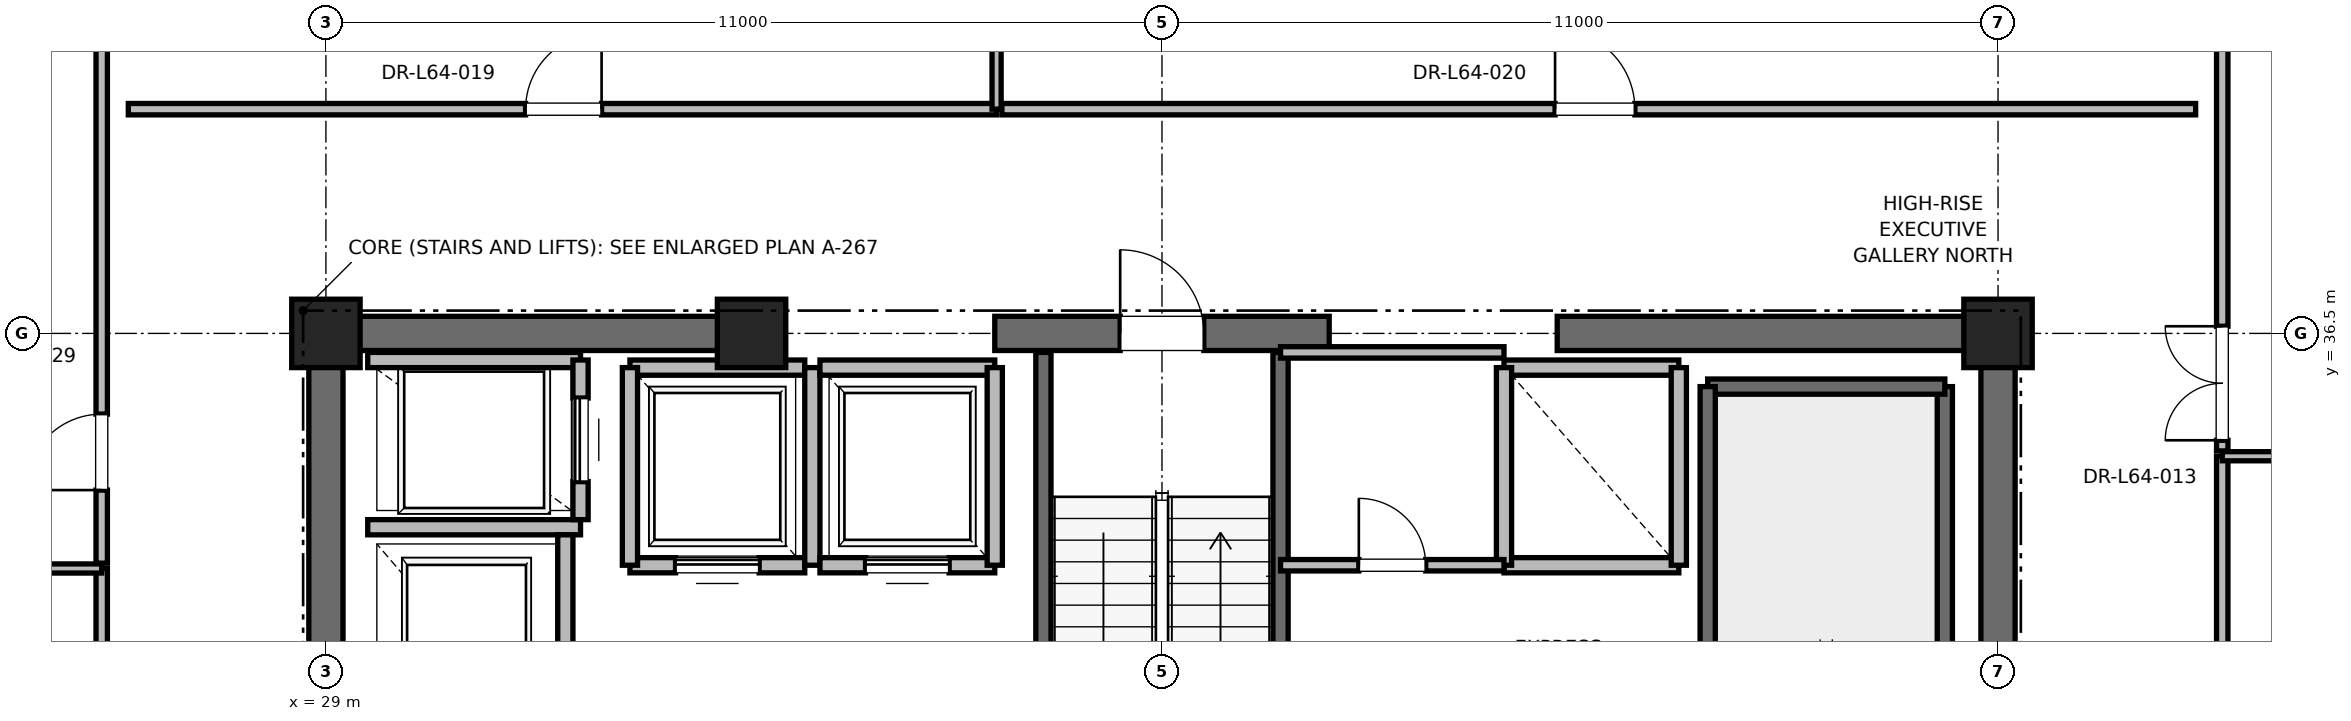
"""IFC4 building model, lengths in metres.
Left out: names, types, materials, properties, quantities, classifications, styles, units other than length and angle.
Written with IfcOpenShell. Run it as: python <this file> out.ifc"""

import sys

from ifc_helpers import new_model, si_unit, direction, frame, frame_2d, origin, origin_2d, place, context, subcontext, project, spatial, rectangle, extrude, element, fill, save


model = new_model("IFC4")
c1 = context("Model", 3, precision=1e-05, world=origin(), true_north=direction((0.0, 1.0)))
c2 = subcontext(c1, "Body", "Model", "MODEL_VIEW")
j1 = project(units=[si_unit("LENGTHUNIT", "METRE"), si_unit("PLANEANGLEUNIT", "RADIAN")], contexts=[c1])
p1 = place(None, origin())
s1 = spatial("IfcSite", under=j1, at=p1, CompositionType="ELEMENT")
p2 = place(p1, origin())
s2 = spatial("IfcBuilding", under=s1, at=p2, CompositionType="ELEMENT")
p3 = place(p2, frame((0.0, 0.0, 275.2)))
s3 = spatial("IfcBuildingStorey", under=s2, at=p3, CompositionType="ELEMENT", Elevation=275.2)
for number, where, z_axis, x_axis in (
    (1, (29.0, 36.5, 0.0), (0.0, 0.0, 1.0), (1.0, 0.0, 0.0)),
    (2, (51.0, 36.5, 0.0), (0.0, 0.0, 1.0), (1.0, 0.0, 0.0)),
    (3, (34.6, 36.5, 0.0), (0.0, 0.0, 1.0), (1.0, 0.0, 0.0)),
):
    element("IfcColumn", number, at=place(p3, frame(where, z_axis=z_axis, x_axis=x_axis)), inside=s3, PredefinedType="PILASTER", context=c2, shape_type="SweptSolid", body=[
        extrude(rectangle(XDim=0.9, YDim=0.9, at=origin_2d()), origin(), (0.0, 0.0, 1.0), 4.0),
    ])
p4 = place(p3, frame((29.0, 36.5, 0.0), z_axis=(0.0, 0.0, 1.0), x_axis=(1.0, 0.0, 0.0)))
e4 = element("IfcWall", 4, at=p4, inside=s3, PredefinedType="SHEAR", context=c2, shape_type="SweptSolid", body=[
    extrude(rectangle(XDim=5.8, YDim=0.45, at=frame_2d((2.9, 0.0))), origin(), (0.0, 0.0, 1.0), 3.785),
])
p5 = place(p3, frame((37.8, 36.5, 0.0), z_axis=(0.0, 0.0, 1.0), x_axis=(1.0, 0.0, 0.0)))
e5 = element("IfcWall", 5, at=p5, inside=s3, PredefinedType="SHEAR", context=c2, shape_type="SweptSolid", body=[
    extrude(rectangle(XDim=4.4, YDim=0.45, at=frame_2d((2.2, 0.0))), origin(), (0.0, 0.0, 1.0), 3.785),
])
p6 = place(p5, frame((1.65, 0.0, 0.0)))
e6 = element("IfcOpeningElement", 6, at=p6, cuts=e5, PredefinedType="OPENING", context=c2, shape_type="SweptSolid", body=[
    extrude(rectangle(XDim=1.1, YDim=2.15, at=frame_2d((0.55, 1.075))), frame((0.0, 0.225, 0.0), z_axis=(0.0, -1.0, 0.0), x_axis=(1.0, 0.0, 0.0)), (0.0, 0.0, 1.0), 0.45),
])
for number, where, z_axis, x_axis in (
    (7, (45.2, 36.5, 0.0), (0.0, 0.0, 1.0), (1.0, 0.0, 0.0)),
    (8, (29.0, 30.7, 0.0), (0.0, 0.0, 1.0), (0.0, 1.0, 0.0)),
):
    element("IfcWall", number, at=place(p3, frame(where, z_axis=z_axis, x_axis=x_axis)), inside=s3, PredefinedType="SHEAR", context=c2, shape_type="SweptSolid", body=[
        extrude(rectangle(XDim=5.8, YDim=0.45, at=frame_2d((2.9, 0.0))), origin(), (0.0, 0.0, 1.0), 3.785),
    ])
p7 = place(p3, frame((51.0, 27.7, 0.0), z_axis=(0.0, 0.0, 1.0), x_axis=(0.0, 1.0, 0.0)))
e9 = element("IfcWall", 9, at=p7, inside=s3, PredefinedType="SHEAR", context=c2, shape_type="SweptSolid", body=[
    extrude(rectangle(XDim=8.8, YDim=0.45, at=frame_2d((4.4, 0.0))), origin(), (0.0, 0.0, 1.0), 3.785),
])
p8 = place(p3, frame((50.3, 27.65, 0.0), z_axis=(0.0, 0.0, 1.0), x_axis=(0.0, 1.0, 0.0)))
e10 = element("IfcWall", 10, at=p8, inside=s3, PredefinedType="SOLIDWALL", context=c2, shape_type="SweptSolid", body=[
    extrude(rectangle(XDim=8.15, YDim=0.2, at=frame_2d((4.075, 0.0))), origin(), (0.0, 0.0, 1.0), 3.785),
])
p9 = place(p3, frame((47.18, 35.8, 0.0), z_axis=(0.0, 0.0, 1.0), x_axis=(1.0, 0.0, 0.0)))
e11 = element("IfcWall", 11, at=p9, inside=s3, PredefinedType="SOLIDWALL", context=c2, shape_type="SweptSolid", body=[
    extrude(rectangle(XDim=3.12, YDim=0.2, at=frame_2d((1.56, 0.0))), origin(), (0.0, 0.0, 1.0), 3.785),
])
p10 = place(p3, frame((47.18, 27.62, 0.0), z_axis=(0.0, 0.0, 1.0), x_axis=(0.0, 1.0, 0.0)))
e12 = element("IfcWall", 12, at=p10, inside=s3, PredefinedType="SOLIDWALL", context=c2, shape_type="SweptSolid", body=[
    extrude(rectangle(XDim=8.18, YDim=0.2, at=frame_2d((4.09, 0.0))), origin(), (0.0, 0.0, 1.0), 3.785),
])
p11 = place(p3, frame((38.44, 27.38, 0.0), z_axis=(0.0, 0.0, 1.0), x_axis=(0.0, 1.0, 0.0)))
e13 = element("IfcWall", 13, at=p11, inside=s3, PredefinedType="SOLIDWALL", context=c2, shape_type="SweptSolid", body=[
    extrude(rectangle(XDim=8.87, YDim=0.2, at=frame_2d((4.435, 0.0))), origin(), (0.0, 0.0, 1.0), 3.785),
])
p12 = place(p3, frame((41.56, 27.68, 0.0), z_axis=(0.0, 0.0, 1.0), x_axis=(0.0, 1.0, 0.0)))
e14 = element("IfcWall", 14, at=p12, inside=s3, PredefinedType="SOLIDWALL", context=c2, shape_type="SweptSolid", body=[
    extrude(rectangle(XDim=8.57, YDim=0.2, at=frame_2d((4.285, 0.0))), origin(), (0.0, 0.0, 1.0), 3.785),
])
p13 = place(p3, frame((29.55, 33.95, 0.0), z_axis=(0.0, 0.0, 1.0), x_axis=(1.0, 0.0, 0.0)))
e15 = element("IfcWall", 15, at=p13, inside=s3, PredefinedType="SOLIDWALL", context=c2, shape_type="SweptSolid", body=[
    extrude(rectangle(XDim=2.8, YDim=0.2, at=frame_2d((1.4, 0.0))), origin(), (0.0, 0.0, 1.0), 3.785),
])
p14 = place(p3, frame((32.15, 30.85, 0.0), z_axis=(0.0, 0.0, 1.0), x_axis=(0.0, 1.0, 0.0)))
e16 = element("IfcWall", 16, at=p14, inside=s3, PredefinedType="SOLIDWALL", context=c2, shape_type="SweptSolid", body=[
    extrude(rectangle(XDim=3.0, YDim=0.2, at=frame_2d((1.5, 0.0))), origin(), (0.0, 0.0, 1.0), 3.785),
])
p15 = place(p3, frame((32.35, 36.15, 0.0), z_axis=(0.0, 0.0, 1.0), x_axis=(-1.0, 0.0, 0.0)))
e17 = element("IfcWall", 17, at=p15, inside=s3, PredefinedType="SOLIDWALL", context=c2, shape_type="SweptSolid", body=[
    extrude(rectangle(XDim=2.8, YDim=0.2, at=frame_2d((1.4, 0.0))), origin(), (0.0, 0.0, 1.0), 3.148),
])
p16 = place(p3, frame((32.35, 34.05, 0.0), z_axis=(0.0, 0.0, 1.0), x_axis=(0.0, 1.0, 0.0)))
e18 = element("IfcWall", 18, at=p16, inside=s3, PredefinedType="SOLIDWALL", context=c2, shape_type="SweptSolid", body=[
    extrude(rectangle(XDim=2.1, YDim=0.2, at=frame_2d((1.05, 0.0))), origin(), (0.0, 0.0, 1.0), 3.785),
])
p17 = place(p16, frame((0.5, 0.0, 0.0)))
e19 = element("IfcOpeningElement", 19, at=p17, cuts=e18, PredefinedType="OPENING", context=c2, shape_type="SweptSolid", body=[
    extrude(rectangle(XDim=1.1, YDim=2.2, at=frame_2d((0.55, 1.1))), frame((0.0, 0.1, 0.0), z_axis=(0.0, -1.0, 0.0), x_axis=(1.0, 0.0, 0.0)), (0.0, 0.0, 1.0), 0.2),
])
p18 = place(p3, frame((33.0, 33.45, 0.0), z_axis=(0.0, 0.0, 1.0), x_axis=(1.0, 0.0, 0.0)))
e20 = element("IfcWall", 20, at=p18, inside=s3, PredefinedType="SOLIDWALL", context=c2, shape_type="SweptSolid", body=[
    extrude(rectangle(XDim=2.3, YDim=0.2, at=frame_2d((1.15, 0.0))), origin(), (0.0, 0.0, 1.0), 3.785),
])
p19 = place(p18, frame((0.6, 0.0, 0.0)))
e21 = element("IfcOpeningElement", 21, at=p19, cuts=e20, PredefinedType="OPENING", context=c2, shape_type="SweptSolid", body=[
    extrude(rectangle(XDim=1.1, YDim=2.2, at=frame_2d((0.55, 1.1))), frame((0.0, 0.1, 0.0), z_axis=(0.0, -1.0, 0.0), x_axis=(1.0, 0.0, 0.0)), (0.0, 0.0, 1.0), 0.2),
])
p20 = place(p3, frame((35.3, 36.05, 0.0), z_axis=(0.0, 0.0, 1.0), x_axis=(-1.0, 0.0, 0.0)))
e22 = element("IfcWall", 22, at=p20, inside=s3, PredefinedType="SOLIDWALL", context=c2, shape_type="SweptSolid", body=[
    extrude(rectangle(XDim=2.3, YDim=0.2, at=frame_2d((1.15, 0.0))), origin(), (0.0, 0.0, 1.0), 2.865),
])
p21 = place(p3, frame((33.0, 36.05, 0.0), z_axis=(0.0, 0.0, 1.0), x_axis=(0.0, -1.0, 0.0)))
e23 = element("IfcWall", 23, at=p21, inside=s3, PredefinedType="SOLIDWALL", context=c2, shape_type="SweptSolid", body=[
    extrude(rectangle(XDim=2.6, YDim=0.2, at=frame_2d((1.3, 0.0))), origin(), (0.0, 0.0, 1.0), 3.785),
])
p22 = place(p3, frame((35.4, 33.45, 0.0), z_axis=(0.0, 0.0, 1.0), x_axis=(0.0, 1.0, 0.0)))
e24 = element("IfcWall", 24, at=p22, inside=s3, PredefinedType="SOLIDWALL", context=c2, shape_type="SweptSolid", body=[
    extrude(rectangle(XDim=2.6, YDim=0.2, at=frame_2d((1.3, 0.0))), origin(), (0.0, 0.0, 1.0), 2.865),
])
p23 = place(p3, frame((35.5, 33.45, 0.0), z_axis=(0.0, 0.0, 1.0), x_axis=(1.0, 0.0, 0.0)))
e25 = element("IfcWall", 25, at=p23, inside=s3, PredefinedType="SOLIDWALL", context=c2, shape_type="SweptSolid", body=[
    extrude(rectangle(XDim=2.3, YDim=0.2, at=frame_2d((1.15, 0.0))), origin(), (0.0, 0.0, 1.0), 3.785),
])
p24 = place(p23, frame((0.6, 0.0, 0.0)))
e26 = element("IfcOpeningElement", 26, at=p24, cuts=e25, PredefinedType="OPENING", context=c2, shape_type="SweptSolid", body=[
    extrude(rectangle(XDim=1.1, YDim=2.2, at=frame_2d((0.55, 1.1))), frame((0.0, 0.1, 0.0), z_axis=(0.0, -1.0, 0.0), x_axis=(1.0, 0.0, 0.0)), (0.0, 0.0, 1.0), 0.2),
])
p25 = place(p3, frame((37.8, 36.05, 0.0), z_axis=(0.0, 0.0, 1.0), x_axis=(-1.0, 0.0, 0.0)))
e27 = element("IfcWall", 27, at=p25, inside=s3, PredefinedType="SOLIDWALL", context=c2, shape_type="SweptSolid", body=[
    extrude(rectangle(XDim=2.3, YDim=0.2, at=frame_2d((1.15, 0.0))), origin(), (0.0, 0.0, 1.0), 2.865),
])
p26 = place(p3, frame((37.8, 33.45, 0.0), z_axis=(0.0, 0.0, 1.0), x_axis=(0.0, 1.0, 0.0)))
e28 = element("IfcWall", 28, at=p26, inside=s3, PredefinedType="SOLIDWALL", context=c2, shape_type="SweptSolid", body=[
    extrude(rectangle(XDim=2.6, YDim=0.2, at=frame_2d((1.3, 0.0))), origin(), (0.0, 0.0, 1.0), 2.865),
])
p27 = place(p3, frame((44.5, 33.45, 0.0), z_axis=(0.0, 0.0, 1.0), x_axis=(1.0, 0.0, 0.0)))
e29 = element("IfcWall", 29, at=p27, inside=s3, PredefinedType="SOLIDWALL", context=c2, shape_type="SweptSolid", body=[
    extrude(rectangle(XDim=2.3, YDim=0.2, at=frame_2d((1.15, 0.0))), origin(), (0.0, 0.0, 1.0), 3.785),
])
p28 = place(p3, frame((46.8, 36.05, 0.0), z_axis=(0.0, 0.0, 1.0), x_axis=(-1.0, 0.0, 0.0)))
e30 = element("IfcWall", 30, at=p28, inside=s3, PredefinedType="SOLIDWALL", context=c2, shape_type="SweptSolid", body=[
    extrude(rectangle(XDim=2.3, YDim=0.2, at=frame_2d((1.15, 0.0))), origin(), (0.0, 0.0, 1.0), 2.865),
])
p29 = place(p3, frame((44.5, 36.05, 0.0), z_axis=(0.0, 0.0, 1.0), x_axis=(0.0, -1.0, 0.0)))
e31 = element("IfcWall", 31, at=p29, inside=s3, PredefinedType="SOLIDWALL", context=c2, shape_type="SweptSolid", body=[
    extrude(rectangle(XDim=2.6, YDim=0.2, at=frame_2d((1.3, 0.0))), origin(), (0.0, 0.0, 1.0), 2.865),
])
p30 = place(p3, frame((46.8, 33.45, 0.0), z_axis=(0.0, 0.0, 1.0), x_axis=(0.0, 1.0, 0.0)))
e32 = element("IfcWall", 32, at=p30, inside=s3, PredefinedType="SOLIDWALL", context=c2, shape_type="SweptSolid", body=[
    extrude(rectangle(XDim=2.6, YDim=0.2, at=frame_2d((1.3, 0.0))), origin(), (0.0, 0.0, 1.0), 3.785),
])
p31 = place(p3, frame((41.56, 36.25, 0.0), z_axis=(0.0, 0.0, 1.0), x_axis=(1.0, 0.0, 0.0)))
e33 = element("IfcWall", 33, at=p31, inside=s3, PredefinedType="PARTITIONING", context=c2, shape_type="SweptSolid", body=[
    extrude(rectangle(XDim=2.94, YDim=0.15, at=frame_2d((1.47, 0.0))), origin(), (0.0, 0.0, 1.0), 2.85),
])
p32 = place(p3, frame((41.56, 33.45, 0.0), z_axis=(0.0, 0.0, 1.0), x_axis=(1.0, 0.0, 0.0)))
e34 = element("IfcWall", 34, at=p32, inside=s3, PredefinedType="PARTITIONING", context=c2, shape_type="SweptSolid", body=[
    extrude(rectangle(XDim=2.94, YDim=0.15, at=frame_2d((1.47, 0.0))), origin(), (0.0, 0.0, 1.0), 2.85),
])
p33 = place(p32, frame((1.03, 0.0, 0.0)))
e35 = element("IfcOpeningElement", 35, at=p33, cuts=e34, PredefinedType="OPENING", context=c2, shape_type="SweptSolid", body=[
    extrude(rectangle(XDim=0.88, YDim=2.1, at=frame_2d((0.44, 1.05))), frame((0.0, 0.075, 0.0), z_axis=(0.0, -1.0, 0.0), x_axis=(1.0, 0.0, 0.0)), (0.0, 0.0, 1.0), 0.15),
])
p34 = place(p3, frame((26.4, 39.45, 0.0), z_axis=(0.0, 0.0, 1.0), x_axis=(1.0, 0.0, 0.0)))
e36 = element("IfcWall", 36, at=p34, inside=s3, PredefinedType="PARTITIONING", context=c2, shape_type="SweptSolid", body=[
    extrude(rectangle(XDim=11.424, YDim=0.15, at=frame_2d((5.712, 0.0))), origin(), (0.0, 0.0, 1.0), 2.85),
])
p35 = place(p34, frame((5.227, 0.0, 0.0)))
e37 = element("IfcOpeningElement", 37, at=p35, cuts=e36, PredefinedType="OPENING", context=c2, shape_type="SweptSolid", body=[
    extrude(rectangle(XDim=1.0, YDim=2.15, at=frame_2d((0.5, 1.075))), frame((0.0, 0.075, 0.0), z_axis=(0.0, -1.0, 0.0), x_axis=(1.0, 0.0, 0.0)), (0.0, 0.0, 1.0), 0.15),
])
p36 = place(p3, frame((37.824, 39.45, 0.0), z_axis=(0.0, 0.0, 1.0), x_axis=(0.0, 1.0, 0.0)))
e38 = element("IfcWall", 38, at=p36, inside=s3, PredefinedType="PARTITIONING", context=c2, shape_type="SweptSolid", body=[
    extrude(rectangle(XDim=10.31, YDim=0.12, at=frame_2d((5.155, 0.0))), origin(), (0.0, 0.0, 1.0), 2.415),
])
p37 = place(p3, frame((37.894, 39.45, 0.0), z_axis=(0.0, 0.0, 1.0), x_axis=(1.0, 0.0, 0.0)))
e39 = element("IfcWall", 39, at=p37, inside=s3, PredefinedType="PARTITIONING", context=c2, shape_type="SweptSolid", body=[
    extrude(rectangle(XDim=15.706, YDim=0.15, at=frame_2d((7.853, 0.0))), origin(), (0.0, 0.0, 1.0), 2.85),
])
p38 = place(p37, frame((7.278, 0.0, 0.0)))
e40 = element("IfcOpeningElement", 40, at=p38, cuts=e39, PredefinedType="OPENING", context=c2, shape_type="SweptSolid", body=[
    extrude(rectangle(XDim=1.05, YDim=2.2, at=frame_2d((0.525, 1.1))), frame((0.0, 0.075, 0.0), z_axis=(0.0, -1.0, 0.0), x_axis=(1.0, 0.0, 0.0)), (0.0, 0.0, 1.0), 0.15),
])
p39 = place(p3, frame((26.05, 20.186, 0.0), z_axis=(0.0, 0.0, 1.0), x_axis=(0.0, 1.0, 0.0)))
e41 = element("IfcWall", 41, at=p39, inside=s3, PredefinedType="PARTITIONING", context=c2, shape_type="SweptSolid", body=[
    extrude(rectangle(XDim=13.221, YDim=0.15, at=frame_2d((6.611, 0.0))), origin(), (0.0, 0.0, 1.0), 2.85),
])
p40 = place(p39, frame((6.076, 0.0, 0.0)))
e42 = element("IfcOpeningElement", 42, at=p40, cuts=e41, PredefinedType="OPENING", context=c2, shape_type="SweptSolid", body=[
    extrude(rectangle(XDim=1.0, YDim=2.15, at=frame_2d((0.5, 1.075))), frame((0.0, 0.075, 0.0), z_axis=(0.0, -1.0, 0.0), x_axis=(1.0, 0.0, 0.0)), (0.0, 0.0, 1.0), 0.15),
])
p41 = place(p3, frame((14.131, 33.407, 0.0), z_axis=(0.0, 0.0, 1.0), x_axis=(1.0, 0.0, 0.0)))
e43 = element("IfcWall", 43, at=p41, inside=s3, PredefinedType="PARTITIONING", context=c2, shape_type="SweptSolid", body=[
    extrude(rectangle(XDim=11.919, YDim=0.12, at=frame_2d((5.96, 0.0))), origin(), (0.0, 0.0, 1.0), 2.85),
])
p42 = place(p3, frame((26.05, 33.477, 0.0), z_axis=(0.0, 0.0, 1.0), x_axis=(0.0, 1.0, 0.0)))
e44 = element("IfcWall", 44, at=p42, inside=s3, PredefinedType="PARTITIONING", context=c2, shape_type="SweptSolid", body=[
    extrude(rectangle(XDim=12.483, YDim=0.15, at=frame_2d((6.241, 0.0))), origin(), (0.0, 0.0, 1.0), 2.85),
])
p43 = place(p42, frame((0.961, 0.0, 0.0)))
e45 = element("IfcOpeningElement", 45, at=p43, cuts=e44, PredefinedType="OPENING", context=c2, shape_type="SweptSolid", body=[
    extrude(rectangle(XDim=1.0, YDim=2.15, at=frame_2d((0.5, 1.075))), frame((0.0, 0.075, 0.0), z_axis=(0.0, -1.0, 0.0), x_axis=(1.0, 0.0, 0.0)), (0.0, 0.0, 1.0), 0.15),
])
p44 = place(p3, frame((53.95, 22.401, 0.0), z_axis=(0.0, 0.0, 1.0), x_axis=(0.0, 1.0, 0.0)))
e46 = element("IfcWall", 46, at=p44, inside=s3, PredefinedType="PARTITIONING", context=c2, shape_type="SweptSolid", body=[
    extrude(rectangle(XDim=12.483, YDim=0.15, at=frame_2d((6.241, 0.0))), origin(), (0.0, 0.0, 1.0), 2.85),
])
p45 = place(p44, frame((5.681, 0.0, 0.0)))
e47 = element("IfcOpeningElement", 47, at=p45, cuts=e46, PredefinedType="OPENING", context=c2, shape_type="SweptSolid", body=[
    extrude(rectangle(XDim=1.05, YDim=2.2, at=frame_2d((0.525, 1.1))), frame((0.0, 0.075, 0.0), z_axis=(0.0, -1.0, 0.0), x_axis=(1.0, 0.0, 0.0)), (0.0, 0.0, 1.0), 0.15),
])
p46 = place(p3, frame((53.95, 34.884, 0.0), z_axis=(0.0, 0.0, 1.0), x_axis=(1.0, 0.0, 0.0)))
e48 = element("IfcWall", 48, at=p46, inside=s3, PredefinedType="PARTITIONING", context=c2, shape_type="SweptSolid", body=[
    extrude(rectangle(XDim=11.919, YDim=0.12, at=frame_2d((5.96, 0.0))), origin(), (0.0, 0.0, 1.0), 2.85),
])
p47 = place(p3, frame((53.95, 34.954, 0.0), z_axis=(0.0, 0.0, 1.0), x_axis=(0.0, 1.0, 0.0)))
e49 = element("IfcWall", 49, at=p47, inside=s3, PredefinedType="PARTITIONING", context=c2, shape_type="SweptSolid", body=[
    extrude(rectangle(XDim=11.006, YDim=0.15, at=frame_2d((5.503, 0.0))), origin(), (0.0, 0.0, 1.0), 2.85),
])
p48 = place(p47, frame((0.14, 0.0, 0.0)))
e50 = element("IfcOpeningElement", 50, at=p48, cuts=e49, PredefinedType="OPENING", context=c2, shape_type="SweptSolid", body=[
    extrude(rectangle(XDim=1.5, YDim=2.25, at=frame_2d((0.75, 1.125))), frame((0.0, 0.075, 0.0), z_axis=(0.0, -1.0, 0.0), x_axis=(1.0, 0.0, 0.0)), (0.0, 0.0, 1.0), 0.15),
])
p49 = place(p6, origin())
e51 = element("IfcDoor", 51, at=p49, inside=s3, OperationType="SINGLE_SWING_LEFT", PredefinedType="DOOR", context=c2, shape_type="SweptSolid", body=[
    extrude(rectangle(XDim=1.1, YDim=2.15, at=frame_2d((0.55, 1.075))), frame((0.0, 0.025, 0.0), z_axis=(0.0, -1.0, 0.0), x_axis=(1.0, 0.0, 0.0)), (0.0, 0.0, 1.0), 0.05),
])
fill(e6, e51)
p50 = place(p17, origin())
e52 = element("IfcDoor", 52, at=p50, inside=s3, OperationType="SLIDING_TO_RIGHT", PredefinedType="DOOR", context=c2, shape_type="SweptSolid", body=[
    extrude(rectangle(XDim=1.1, YDim=2.2, at=frame_2d((0.55, 1.1))), frame((0.0, 0.025, 0.0), z_axis=(0.0, -1.0, 0.0), x_axis=(1.0, 0.0, 0.0)), (0.0, 0.0, 1.0), 0.05),
])
fill(e19, e52)
p51 = place(p19, origin())
e53 = element("IfcDoor", 53, at=p51, inside=s3, OperationType="SLIDING_TO_RIGHT", PredefinedType="DOOR", context=c2, shape_type="SweptSolid", body=[
    extrude(rectangle(XDim=1.1, YDim=2.2, at=frame_2d((0.55, 1.1))), frame((0.0, 0.025, 0.0), z_axis=(0.0, -1.0, 0.0), x_axis=(1.0, 0.0, 0.0)), (0.0, 0.0, 1.0), 0.05),
])
fill(e21, e53)
p52 = place(p24, origin())
e54 = element("IfcDoor", 54, at=p52, inside=s3, OperationType="SLIDING_TO_RIGHT", PredefinedType="DOOR", context=c2, shape_type="SweptSolid", body=[
    extrude(rectangle(XDim=1.1, YDim=2.2, at=frame_2d((0.55, 1.1))), frame((0.0, 0.025, 0.0), z_axis=(0.0, -1.0, 0.0), x_axis=(1.0, 0.0, 0.0)), (0.0, 0.0, 1.0), 0.05),
])
fill(e26, e54)
p53 = place(p33, origin())
e55 = element("IfcDoor", 55, at=p53, inside=s3, OperationType="SINGLE_SWING_LEFT", PredefinedType="DOOR", context=c2, shape_type="SweptSolid", body=[
    extrude(rectangle(XDim=0.88, YDim=2.1, at=frame_2d((0.44, 1.05))), frame((0.0, 0.025, 0.0), z_axis=(0.0, -1.0, 0.0), x_axis=(1.0, 0.0, 0.0)), (0.0, 0.0, 1.0), 0.05),
])
fill(e35, e55)
p54 = place(p35, origin())
e56 = element("IfcDoor", 56, at=p54, inside=s3, OperationType="SINGLE_SWING_RIGHT", PredefinedType="DOOR", context=c2, shape_type="SweptSolid", body=[
    extrude(rectangle(XDim=1.0, YDim=2.15, at=frame_2d((0.5, 1.075))), frame((0.0, 0.025, 0.0), z_axis=(0.0, -1.0, 0.0), x_axis=(1.0, 0.0, 0.0)), (0.0, 0.0, 1.0), 0.05),
])
fill(e37, e56)
p55 = place(p38, origin())
e57 = element("IfcDoor", 57, at=p55, inside=s3, OperationType="SINGLE_SWING_LEFT", PredefinedType="DOOR", context=c2, shape_type="SweptSolid", body=[
    extrude(rectangle(XDim=1.05, YDim=2.2, at=frame_2d((0.525, 1.1))), frame((0.0, 0.025, 0.0), z_axis=(0.0, -1.0, 0.0), x_axis=(1.0, 0.0, 0.0)), (0.0, 0.0, 1.0), 0.05),
])
fill(e40, e57)
p56 = place(p43, origin())
e58 = element("IfcDoor", 58, at=p56, inside=s3, OperationType="SINGLE_SWING_LEFT", PredefinedType="DOOR", context=c2, shape_type="SweptSolid", body=[
    extrude(rectangle(XDim=1.0, YDim=2.15, at=frame_2d((0.5, 1.075))), frame((0.0, 0.025, 0.0), z_axis=(0.0, -1.0, 0.0), x_axis=(1.0, 0.0, 0.0)), (0.0, 0.0, 1.0), 0.05),
])
fill(e45, e58)
p57 = place(p48, origin())
e59 = element("IfcDoor", 59, at=p57, inside=s3, OperationType="DOUBLE_DOOR_SINGLE_SWING", PredefinedType="DOOR", context=c2, shape_type="SweptSolid", body=[
    extrude(rectangle(XDim=1.5, YDim=2.25, at=frame_2d((0.75, 1.125))), frame((0.0, 0.025, 0.0), z_axis=(0.0, -1.0, 0.0), x_axis=(1.0, 0.0, 0.0)), (0.0, 0.0, 1.0), 0.05),
])
fill(e50, e59)
save(model, sys.argv[1])
